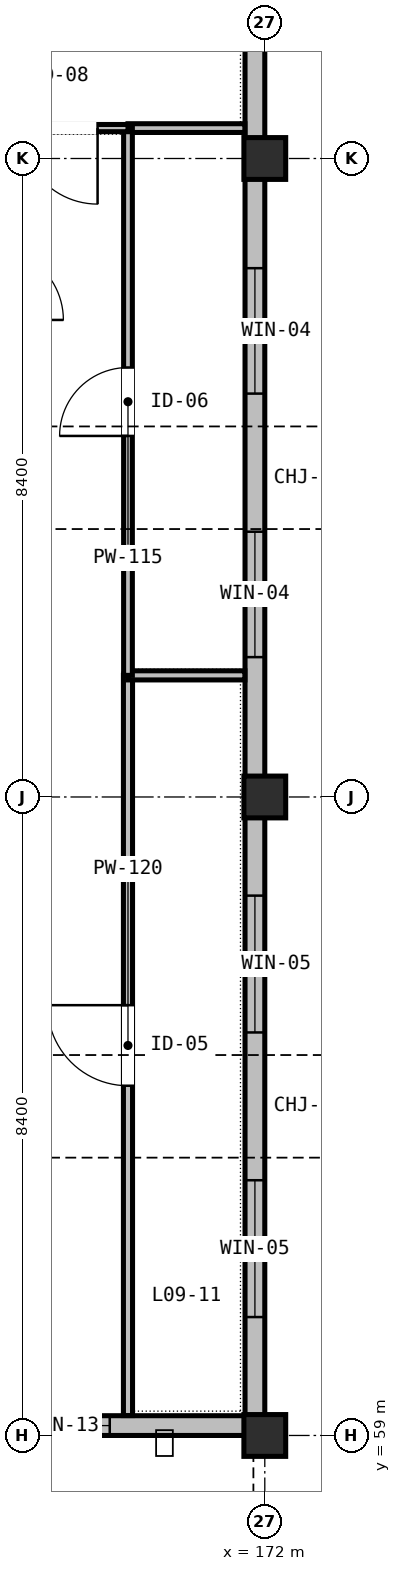
"""IFC4 building model, lengths in metres.
Left out: names, types, materials, properties, quantities, classifications, styles, units other than length and angle.
Written with IfcOpenShell. Run it as: python <this file> out.ifc"""

import sys

from ifc_helpers import new_model, si_unit, direction, frame, frame_2d, origin, origin_2d, place, context, subcontext, project, spatial, rectangle, extrude, element, fill, save


model = new_model("IFC4")
c1 = context("Model", 3, precision=1e-05, world=origin(), true_north=direction((0.0, 1.0)))
c2 = subcontext(c1, "Body", "Model", "MODEL_VIEW")
j1 = project(units=[si_unit("LENGTHUNIT", "METRE"), si_unit("PLANEANGLEUNIT", "RADIAN")], contexts=[c1])
p1 = place(None, origin())
s1 = spatial("IfcSite", under=j1, at=p1, CompositionType="ELEMENT")
p2 = place(p1, origin())
s2 = spatial("IfcBuilding", under=s1, at=p2, CompositionType="ELEMENT")
p3 = place(p2, frame((0.0, 0.0, 40.5)))
s3 = spatial("IfcBuildingStorey", under=s2, at=p3, CompositionType="ELEMENT", Elevation=40.5)
for number, where, z_axis, x_axis in (
    (1, (172.0, 59.0, 0.0), (0.0, 0.0, 1.0), (1.0, 0.0, 0.0)),
    (2, (172.0, 67.4, 0.0), (0.0, 0.0, 1.0), (1.0, 0.0, 0.0)),
    (3, (172.0, 75.8, 0.0), (0.0, 0.0, 1.0), (1.0, 0.0, 0.0)),
):
    element("IfcColumn", number, at=place(p3, frame(where, z_axis=z_axis, x_axis=x_axis)), inside=s3, PredefinedType="COLUMN", context=c2, shape_type="SweptSolid", body=[
        extrude(rectangle(XDim=0.55, YDim=0.55, at=origin_2d()), origin(), (0.0, 0.0, 1.0), 3.84),
    ])
p4 = place(p3, frame((171.87, 83.94, 0.0), z_axis=(0.0, 0.0, 1.0), x_axis=(0.0, -1.0, 0.0)))
e4 = element("IfcWall", 4, at=p4, inside=s3, PredefinedType="STANDARD", context=c2, shape_type="SweptSolid", body=[
    extrude(rectangle(XDim=8.14, YDim=0.26, at=frame_2d((4.07, 0.0))), origin(), (0.0, 0.0, 1.0), 3.285),
])
p5 = place(p4, frame((1.448, 0.0, 0.9)))
e5 = element("IfcOpeningElement", 5, at=p5, cuts=e4, PredefinedType="OPENING", context=c2, shape_type="SweptSolid", body=[
    extrude(rectangle(XDim=1.5, YDim=2.1, at=frame_2d((0.75, 1.05))), frame((0.0, 0.14, 0.0), z_axis=(0.0, -1.0, 0.0), x_axis=(1.0, 0.0, 0.0)), (0.0, 0.0, 1.0), 0.28),
])
p6 = place(p4, frame((5.192, 0.0, 0.9)))
e6 = element("IfcOpeningElement", 6, at=p6, cuts=e4, PredefinedType="OPENING", context=c2, shape_type="SweptSolid", body=[
    extrude(rectangle(XDim=1.5, YDim=2.1, at=frame_2d((0.75, 1.05))), frame((0.0, 0.14, 0.0), z_axis=(0.0, -1.0, 0.0), x_axis=(1.0, 0.0, 0.0)), (0.0, 0.0, 1.0), 0.28),
])
p7 = place(p3, frame((171.87, 75.8, 0.0), z_axis=(0.0, 0.0, 1.0), x_axis=(0.0, -1.0, 0.0)))
e7 = element("IfcWall", 7, at=p7, inside=s3, PredefinedType="STANDARD", context=c2, shape_type="SweptSolid", body=[
    extrude(rectangle(XDim=8.4, YDim=0.26, at=frame_2d((4.2, 0.0))), origin(), (0.0, 0.0, 1.0), 3.285),
])
p8 = place(p7, frame((1.443, 0.0, 0.9)))
e8 = element("IfcOpeningElement", 8, at=p8, cuts=e7, PredefinedType="OPENING", context=c2, shape_type="SweptSolid", body=[
    extrude(rectangle(XDim=1.65, YDim=2.1, at=frame_2d((0.825, 1.05))), frame((0.0, 0.14, 0.0), z_axis=(0.0, -1.0, 0.0), x_axis=(1.0, 0.0, 0.0)), (0.0, 0.0, 1.0), 0.28),
])
p9 = place(p7, frame((4.91, 0.0, 0.9)))
e9 = element("IfcOpeningElement", 9, at=p9, cuts=e7, PredefinedType="OPENING", context=c2, shape_type="SweptSolid", body=[
    extrude(rectangle(XDim=1.65, YDim=2.1, at=frame_2d((0.825, 1.05))), frame((0.0, 0.14, 0.0), z_axis=(0.0, -1.0, 0.0), x_axis=(1.0, 0.0, 0.0)), (0.0, 0.0, 1.0), 0.28),
])
p10 = place(p3, frame((171.87, 67.4, 0.0), z_axis=(0.0, 0.0, 1.0), x_axis=(0.0, -1.0, 0.0)))
e10 = element("IfcWall", 10, at=p10, inside=s3, PredefinedType="STANDARD", context=c2, shape_type="SweptSolid", body=[
    extrude(rectangle(XDim=8.14, YDim=0.26, at=frame_2d((4.07, 0.0))), origin(), (0.0, 0.0, 1.0), 3.285),
])
p11 = place(p10, frame((1.298, 0.0, 0.9)))
e11 = element("IfcOpeningElement", 11, at=p11, cuts=e10, PredefinedType="OPENING", context=c2, shape_type="SweptSolid", body=[
    extrude(rectangle(XDim=1.8, YDim=2.1, at=frame_2d((0.9, 1.05))), frame((0.0, 0.14, 0.0), z_axis=(0.0, -1.0, 0.0), x_axis=(1.0, 0.0, 0.0)), (0.0, 0.0, 1.0), 0.28),
])
p12 = place(p10, frame((5.042, 0.0, 0.9)))
e12 = element("IfcOpeningElement", 12, at=p12, cuts=e10, PredefinedType="OPENING", context=c2, shape_type="SweptSolid", body=[
    extrude(rectangle(XDim=1.8, YDim=2.1, at=frame_2d((0.9, 1.05))), frame((0.0, 0.14, 0.0), z_axis=(0.0, -1.0, 0.0), x_axis=(1.0, 0.0, 0.0)), (0.0, 0.0, 1.0), 0.28),
])
p13 = place(p3, frame((172.0, 59.13, 0.0), z_axis=(0.0, 0.0, 1.0), x_axis=(-1.0, 0.0, 0.0)))
e13 = element("IfcWall", 13, at=p13, inside=s3, PredefinedType="STANDARD", context=c2, shape_type="SweptSolid", body=[
    extrude(rectangle(XDim=6.8, YDim=0.26, at=frame_2d((3.4, 0.0))), origin(), (0.0, 0.0, 1.0), 3.185),
])
p14 = place(p13, frame((2.04, 0.0, 0.9)))
e14 = element("IfcOpeningElement", 14, at=p14, cuts=e13, PredefinedType="OPENING", context=c2, shape_type="SweptSolid", body=[
    extrude(rectangle(XDim=1.2, YDim=1.5, at=frame_2d((0.6, 0.75))), frame((0.0, 0.14, 0.0), z_axis=(0.0, -1.0, 0.0), x_axis=(1.0, 0.0, 0.0)), (0.0, 0.0, 1.0), 0.28),
])
p15 = place(p13, frame((4.364, 0.0, 0.9)))
e15 = element("IfcOpeningElement", 15, at=p15, cuts=e13, PredefinedType="OPENING", context=c2, shape_type="SweptSolid", body=[
    extrude(rectangle(XDim=1.2, YDim=1.5, at=frame_2d((0.6, 0.75))), frame((0.0, 0.14, 0.0), z_axis=(0.0, -1.0, 0.0), x_axis=(1.0, 0.0, 0.0)), (0.0, 0.0, 1.0), 0.28),
])
p16 = place(p3, frame((170.2, 59.262, 0.0), z_axis=(0.0, 0.0, 1.0), x_axis=(0.0, 1.0, 0.0)))
e16 = element("IfcWall", 16, at=p16, inside=s3, PredefinedType="PARTITIONING", context=c2, shape_type="SweptSolid", body=[
    extrude(rectangle(XDim=9.738, YDim=0.12, at=frame_2d((4.869, 0.0))), origin(), (0.0, 0.0, 1.0), 3.285),
])
p17 = place(p16, frame((4.339, 0.0, 0.0)))
e17 = element("IfcOpeningElement", 17, at=p17, cuts=e16, PredefinedType="OPENING", context=c2, shape_type="SweptSolid", body=[
    extrude(rectangle(XDim=1.06, YDim=2.02, at=frame_2d((0.53, 1.01))), frame((0.0, 0.07, 0.0), z_axis=(0.0, -1.0, 0.0), x_axis=(1.0, 0.0, 0.0)), (0.0, 0.0, 1.0), 0.14),
])
p18 = place(p3, frame((170.2, 69.0, 0.0), z_axis=(0.0, 0.0, 1.0), x_axis=(1.0, 0.0, 0.0)))
e18 = element("IfcWall", 18, at=p18, inside=s3, PredefinedType="PARTITIONING", context=c2, shape_type="SweptSolid", body=[
    extrude(rectangle(XDim=1.538, YDim=0.12, at=frame_2d((0.769, 0.0))), origin(), (0.0, 0.0, 1.0), 3.655),
])
p19 = place(p3, frame((170.2, 76.2, 0.0), z_axis=(0.0, 0.0, 1.0), x_axis=(1.0, 0.0, 0.0)))
e19 = element("IfcWall", 19, at=p19, inside=s3, PredefinedType="PARTITIONING", context=c2, shape_type="SweptSolid", body=[
    extrude(rectangle(XDim=1.538, YDim=0.115, at=frame_2d((0.769, 0.0))), origin(), (0.0, 0.0, 1.0), 3.655),
])
p20 = place(p3, frame((170.2, 69.0, 0.0), z_axis=(0.0, 0.0, 1.0), x_axis=(0.0, 1.0, 0.0)))
e20 = element("IfcWall", 20, at=p20, inside=s3, PredefinedType="PARTITIONING", context=c2, shape_type="SweptSolid", body=[
    extrude(rectangle(XDim=7.2, YDim=0.115, at=frame_2d((3.6, 0.0))), origin(), (0.0, 0.0, 1.0), 3.285),
])
p21 = place(p20, frame((3.15, 0.0, 0.0)))
e21 = element("IfcOpeningElement", 21, at=p21, cuts=e20, PredefinedType="OPENING", context=c2, shape_type="SweptSolid", body=[
    extrude(rectangle(XDim=0.9, YDim=2.06, at=frame_2d((0.45, 1.03))), frame((0.0, 0.067, 0.0), z_axis=(0.0, -1.0, 0.0), x_axis=(1.0, 0.0, 0.0)), (0.0, 0.0, 1.0), 0.135),
])
p22 = place(p3, frame((170.2, 76.2, 0.0), z_axis=(0.0, 0.0, 1.0), x_axis=(-1.0, 0.0, 0.0)))
e22 = element("IfcWall", 22, at=p22, inside=s3, PredefinedType="PARTITIONING", context=c2, shape_type="SweptSolid", body=[
    extrude(rectangle(XDim=1.8, YDim=0.095, at=frame_2d((0.9, 0.0))), origin(), (0.0, 0.0, 1.0), 3.435),
])
p23 = place(p22, frame((0.4, 0.0, 0.0)))
e23 = element("IfcOpeningElement", 23, at=p23, cuts=e22, PredefinedType="OPENING", context=c2, shape_type="SweptSolid", body=[
    extrude(rectangle(XDim=1.0, YDim=2.06, at=frame_2d((0.5, 1.03))), frame((0.0, 0.057, 0.0), z_axis=(0.0, -1.0, 0.0), x_axis=(1.0, 0.0, 0.0)), (0.0, 0.0, 1.0), 0.115),
])
p24 = place(p8, origin())
e24 = element("IfcWindow", 24, at=p24, inside=s3, PartitioningType="SINGLE_PANEL", PredefinedType="WINDOW", context=c2, shape_type="SweptSolid", body=[
    extrude(rectangle(XDim=1.65, YDim=2.1, at=frame_2d((0.825, 1.05))), frame((0.0, 0.03, 0.0), z_axis=(0.0, -1.0, 0.0), x_axis=(1.0, 0.0, 0.0)), (0.0, 0.0, 1.0), 0.06),
])
fill(e8, e24)
p25 = place(p9, origin())
e25 = element("IfcWindow", 25, at=p25, inside=s3, PartitioningType="SINGLE_PANEL", PredefinedType="WINDOW", context=c2, shape_type="SweptSolid", body=[
    extrude(rectangle(XDim=1.65, YDim=2.1, at=frame_2d((0.825, 1.05))), frame((0.0, 0.03, 0.0), z_axis=(0.0, -1.0, 0.0), x_axis=(1.0, 0.0, 0.0)), (0.0, 0.0, 1.0), 0.06),
])
fill(e9, e25)
p26 = place(p11, origin())
e26 = element("IfcWindow", 26, at=p26, inside=s3, PartitioningType="SINGLE_PANEL", PredefinedType="WINDOW", context=c2, shape_type="SweptSolid", body=[
    extrude(rectangle(XDim=1.8, YDim=2.1, at=frame_2d((0.9, 1.05))), frame((0.0, 0.03, 0.0), z_axis=(0.0, -1.0, 0.0), x_axis=(1.0, 0.0, 0.0)), (0.0, 0.0, 1.0), 0.06),
])
fill(e11, e26)
p27 = place(p12, origin())
e27 = element("IfcWindow", 27, at=p27, inside=s3, PartitioningType="SINGLE_PANEL", PredefinedType="WINDOW", context=c2, shape_type="SweptSolid", body=[
    extrude(rectangle(XDim=1.8, YDim=2.1, at=frame_2d((0.9, 1.05))), frame((0.0, 0.03, 0.0), z_axis=(0.0, -1.0, 0.0), x_axis=(1.0, 0.0, 0.0)), (0.0, 0.0, 1.0), 0.06),
])
fill(e12, e27)
p28 = place(p14, origin())
e28 = element("IfcWindow", 28, at=p28, inside=s3, PartitioningType="SINGLE_PANEL", PredefinedType="WINDOW", context=c2, shape_type="SweptSolid", body=[
    extrude(rectangle(XDim=1.2, YDim=1.5, at=frame_2d((0.6, 0.75))), frame((0.0, 0.03, 0.0), z_axis=(0.0, -1.0, 0.0), x_axis=(1.0, 0.0, 0.0)), (0.0, 0.0, 1.0), 0.06),
])
fill(e14, e28)
p29 = place(p17, origin())
e29 = element("IfcDoor", 29, at=p29, inside=s3, OperationType="SINGLE_SWING_RIGHT", PredefinedType="DOOR", context=c2, shape_type="SweptSolid", body=[
    extrude(rectangle(XDim=1.06, YDim=2.02, at=frame_2d((0.53, 1.01))), frame((0.0, 0.025, 0.0), z_axis=(0.0, -1.0, 0.0), x_axis=(1.0, 0.0, 0.0)), (0.0, 0.0, 1.0), 0.05),
])
fill(e17, e29)
p30 = place(p21, origin())
e30 = element("IfcDoor", 30, at=p30, inside=s3, OperationType="SINGLE_SWING_LEFT", PredefinedType="DOOR", context=c2, shape_type="SweptSolid", body=[
    extrude(rectangle(XDim=0.9, YDim=2.06, at=frame_2d((0.45, 1.03))), frame((0.0, 0.025, 0.0), z_axis=(0.0, -1.0, 0.0), x_axis=(1.0, 0.0, 0.0)), (0.0, 0.0, 1.0), 0.05),
])
fill(e21, e30)
p31 = place(p23, origin())
e31 = element("IfcDoor", 31, at=p31, inside=s3, OperationType="SINGLE_SWING_LEFT", PredefinedType="DOOR", context=c2, shape_type="SweptSolid", body=[
    extrude(rectangle(XDim=1.0, YDim=2.06, at=frame_2d((0.5, 1.03))), frame((0.0, 0.025, 0.0), z_axis=(0.0, -1.0, 0.0), x_axis=(1.0, 0.0, 0.0)), (0.0, 0.0, 1.0), 0.05),
])
fill(e23, e31)
save(model, sys.argv[1])
